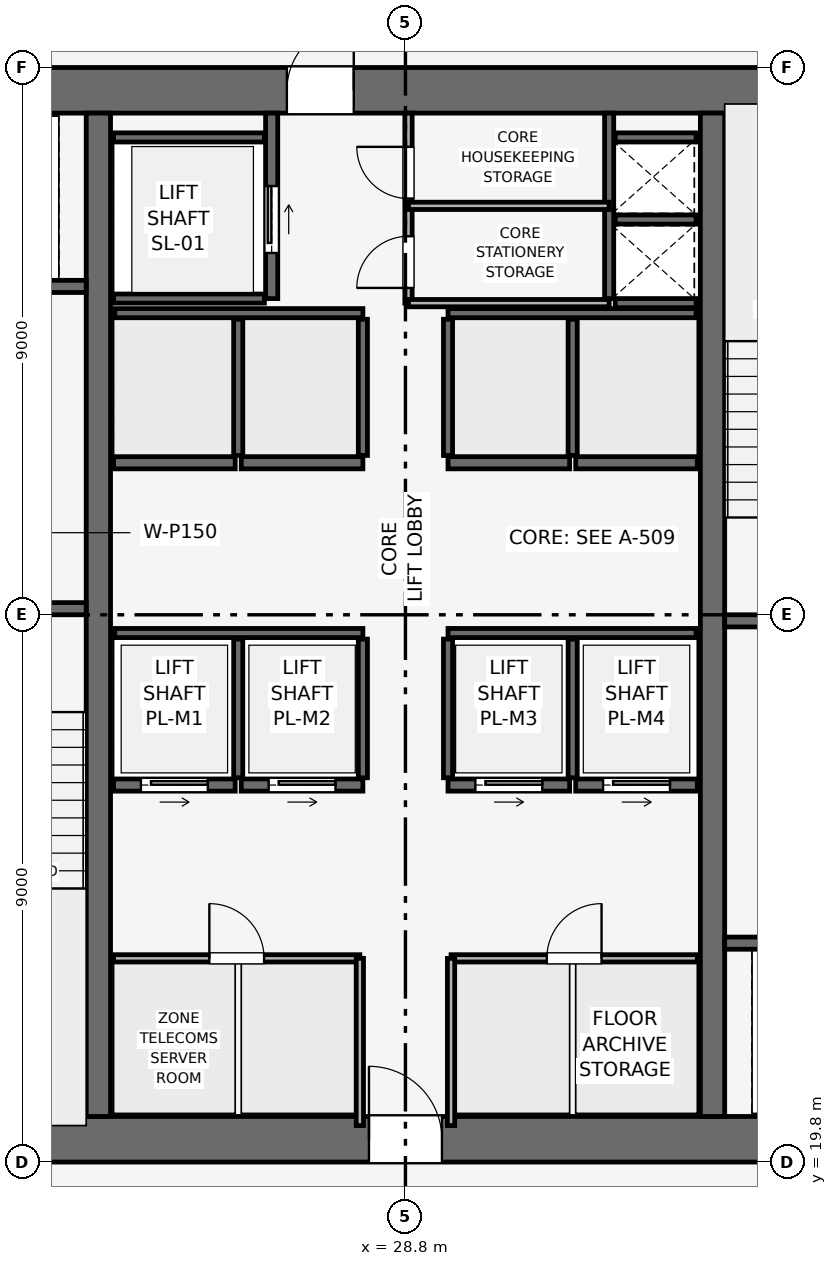
"""IFC4 building model, lengths in metres.
Left out: names, types, materials, properties, quantities, classifications, styles, units other than length and angle.
Written with IfcOpenShell. Run it as: python <this file> out.ifc"""

import sys

from ifc_helpers import new_model, si_unit, direction, frame, frame_2d, origin, place, context, subcontext, project, spatial, rectangle, extrude, element, fill, save


model = new_model("IFC4")
c1 = context("Model", 3, precision=1e-05, world=origin(), true_north=direction((0.0, 1.0)))
c2 = subcontext(c1, "Body", "Model", "MODEL_VIEW")
j1 = project(units=[si_unit("LENGTHUNIT", "METRE"), si_unit("PLANEANGLEUNIT", "RADIAN")], contexts=[c1])
p1 = place(None, origin())
s1 = spatial("IfcSite", under=j1, at=p1, CompositionType="ELEMENT")
p2 = place(p1, origin())
s2 = spatial("IfcBuilding", under=s1, at=p2, CompositionType="ELEMENT")
p3 = place(p2, frame((0.0, 0.0, 222.45)))
s3 = spatial("IfcBuildingStorey", under=s2, at=p3, CompositionType="ELEMENT", Elevation=222.45)
p4 = place(p3, frame((19.8, 20.175, 0.0), z_axis=(0.0, 0.0, 1.0), x_axis=(1.0, 0.0, 0.0)))
e1 = element("IfcWall", 1, at=p4, inside=s3, PredefinedType="SHEAR", context=c2, shape_type="SweptSolid", body=[
    extrude(rectangle(XDim=18.0, YDim=0.75, at=frame_2d((9.0, 0.0))), origin(), (0.0, 0.0, 1.0), 3.75),
])
p5 = place(p4, frame((8.4, 0.0, 0.0)))
e2 = element("IfcOpeningElement", 2, at=p5, cuts=e1, PredefinedType="OPENING", context=c2, shape_type="SweptSolid", body=[
    extrude(rectangle(XDim=1.2, YDim=2.2, at=frame_2d((0.6, 1.1))), frame((0.0, 0.385, 0.0), z_axis=(0.0, -1.0, 0.0), x_axis=(1.0, 0.0, 0.0)), (0.0, 0.0, 1.0), 0.77),
])
p6 = place(p3, frame((19.8, 37.425, 0.0), z_axis=(0.0, 0.0, 1.0), x_axis=(1.0, 0.0, 0.0)))
e3 = element("IfcWall", 3, at=p6, inside=s3, PredefinedType="SHEAR", context=c2, shape_type="SweptSolid", body=[
    extrude(rectangle(XDim=18.0, YDim=0.75, at=frame_2d((9.0, 0.0))), origin(), (0.0, 0.0, 1.0), 3.75),
])
p7 = place(p6, frame((7.05, 0.0, 0.0)))
e4 = element("IfcOpeningElement", 4, at=p7, cuts=e3, PredefinedType="OPENING", context=c2, shape_type="SweptSolid", body=[
    extrude(rectangle(XDim=1.1, YDim=2.15, at=frame_2d((0.55, 1.075))), frame((0.0, 0.385, 0.0), z_axis=(0.0, -1.0, 0.0), x_axis=(1.0, 0.0, 0.0)), (0.0, 0.0, 1.0), 0.77),
])
for number, where, z_axis, x_axis in (
    (5, (23.75, 20.55, 0.0), (0.0, 0.0, 1.0), (0.0, 1.0, 0.0)),
    (6, (33.85, 20.55, 0.0), (0.0, 0.0, 1.0), (0.0, 1.0, 0.0)),
):
    element("IfcWall", number, at=place(p3, frame(where, z_axis=z_axis, x_axis=x_axis)), inside=s3, PredefinedType="SHEAR", context=c2, shape_type="SweptSolid", body=[
        extrude(rectangle(XDim=16.5, YDim=0.4, at=frame_2d((8.25, 0.0))), origin(), (0.0, 0.0, 1.0), 3.75),
    ])
p8 = place(p3, frame((20.4, 28.9, 0.0), z_axis=(0.0, 0.0, 1.0), x_axis=(1.0, 0.0, 0.0)))
e7 = element("IfcWall", 7, at=p8, inside=s3, PredefinedType="SHEAR", context=c2, shape_type="SweptSolid", body=[
    extrude(rectangle(XDim=3.15, YDim=0.2, at=frame_2d((1.575, 0.0))), origin(), (0.0, 0.0, 1.0), 3.5),
])
p9 = place(p8, frame((0.8, 0.0, 0.0)))
e8 = element("IfcOpeningElement", 8, at=p9, cuts=e7, PredefinedType="OPENING", context=c2, shape_type="SweptSolid", body=[
    extrude(rectangle(XDim=1.0, YDim=2.1, at=frame_2d((0.5, 1.05))), frame((0.0, 0.11, 0.0), z_axis=(0.0, -1.0, 0.0), x_axis=(1.0, 0.0, 0.0)), (0.0, 0.0, 1.0), 0.22),
])
p10 = place(p3, frame((34.05, 28.7, 0.0), z_axis=(0.0, 0.0, 1.0), x_axis=(1.0, 0.0, 0.0)))
e9 = element("IfcWall", 9, at=p10, inside=s3, PredefinedType="SHEAR", context=c2, shape_type="SweptSolid", body=[
    extrude(rectangle(XDim=3.15, YDim=0.2, at=frame_2d((1.575, 0.0))), origin(), (0.0, 0.0, 1.0), 3.5),
])
p11 = place(p10, frame((0.8, 0.0, 0.0)))
e10 = element("IfcOpeningElement", 10, at=p11, cuts=e9, PredefinedType="OPENING", context=c2, shape_type="SweptSolid", body=[
    extrude(rectangle(XDim=1.0, YDim=2.1, at=frame_2d((0.5, 1.05))), frame((0.0, 0.11, 0.0), z_axis=(0.0, -1.0, 0.0), x_axis=(1.0, 0.0, 0.0)), (0.0, 0.0, 1.0), 0.22),
])
p12 = place(p3, frame((32.15, 34.0, 0.0), z_axis=(0.0, 0.0, 1.0), x_axis=(0.0, 1.0, 0.0)))
e11 = element("IfcWall", 11, at=p12, inside=s3, PredefinedType="SHEAR", context=c2, shape_type="SweptSolid", body=[
    extrude(rectangle(XDim=3.05, YDim=0.15, at=frame_2d((1.525, 0.0))), origin(), (0.0, 0.0, 1.0), 3.5),
])
for number, where, z_axis, x_axis in (
    (12, (32.25, 33.925, 0.0), (0.0, 0.0, 1.0), (1.0, 0.0, 0.0)),
    (13, (32.25, 35.3, 0.0), (0.0, 0.0, 1.0), (1.0, 0.0, 0.0)),
):
    element("IfcWall", number, at=place(p3, frame(where, z_axis=z_axis, x_axis=x_axis)), inside=s3, PredefinedType="SHEAR", context=c2, shape_type="SweptSolid", body=[
        extrude(rectangle(XDim=1.33, YDim=0.15, at=frame_2d((0.665, 0.0))), origin(), (0.0, 0.0, 1.0), 3.5),
    ])
p13 = place(p3, frame((20.5, 34.2, 0.0), z_axis=(0.0, 0.0, 1.0), x_axis=(1.0, 0.0, 0.0)))
e14 = element("IfcWall", 14, at=p13, inside=s3, PredefinedType="SHEAR", context=c2, shape_type="SweptSolid", body=[
    extrude(rectangle(XDim=3.05, YDim=0.2, at=frame_2d((1.525, 0.0))), origin(), (0.0, 0.0, 1.0), 3.5),
])
p14 = place(p13, frame((0.75, 0.0, 0.0)))
e15 = element("IfcOpeningElement", 15, at=p14, cuts=e14, PredefinedType="OPENING", context=c2, shape_type="SweptSolid", body=[
    extrude(rectangle(XDim=1.1, YDim=2.15, at=frame_2d((0.55, 1.075))), frame((0.0, 0.11, 0.0), z_axis=(0.0, -1.0, 0.0), x_axis=(1.0, 0.0, 0.0)), (0.0, 0.0, 1.0), 0.22),
])
p15 = place(p3, frame((34.05, 23.4, 0.0), z_axis=(0.0, 0.0, 1.0), x_axis=(1.0, 0.0, 0.0)))
e16 = element("IfcWall", 16, at=p15, inside=s3, PredefinedType="SHEAR", context=c2, shape_type="SweptSolid", body=[
    extrude(rectangle(XDim=3.05, YDim=0.2, at=frame_2d((1.525, 0.0))), origin(), (0.0, 0.0, 1.0), 3.5),
])
p16 = place(p15, frame((1.2, 0.0, 0.0)))
e17 = element("IfcOpeningElement", 17, at=p16, cuts=e16, PredefinedType="OPENING", context=c2, shape_type="SweptSolid", body=[
    extrude(rectangle(XDim=1.1, YDim=2.15, at=frame_2d((0.55, 1.075))), frame((0.0, 0.11, 0.0), z_axis=(0.0, -1.0, 0.0), x_axis=(1.0, 0.0, 0.0)), (0.0, 0.0, 1.0), 0.22),
])
p17 = place(p3, frame((26.6, 34.0, 0.0), z_axis=(0.0, 0.0, 1.0), x_axis=(0.0, 1.0, 0.0)))
e18 = element("IfcWall", 18, at=p17, inside=s3, PredefinedType="SHEAR", context=c2, shape_type="SweptSolid", body=[
    extrude(rectangle(XDim=3.05, YDim=0.2, at=frame_2d((1.525, 0.0))), origin(), (0.0, 0.0, 1.0), 3.5),
])
p18 = place(p17, frame((0.75, 0.0, 0.0)))
e19 = element("IfcOpeningElement", 19, at=p18, cuts=e18, PredefinedType="OPENING", context=c2, shape_type="SweptSolid", body=[
    extrude(rectangle(XDim=1.1, YDim=2.15, at=frame_2d((0.55, 1.075))), frame((0.0, 0.11, 0.0), z_axis=(0.0, -1.0, 0.0), x_axis=(1.0, 0.0, 0.0)), (0.0, 0.0, 1.0), 0.22),
])
for number, where, z_axis, x_axis in (
    (20, (24.0, 34.0, 0.0), (0.0, 0.0, 1.0), (1.0, 0.0, 0.0)),
    (21, (24.0, 36.65, 0.0), (0.0, 0.0, 1.0), (1.0, 0.0, 0.0)),
):
    element("IfcWall", number, at=place(p3, frame(where, z_axis=z_axis, x_axis=x_axis)), inside=s3, PredefinedType="SHEAR", context=c2, shape_type="SweptSolid", body=[
        extrude(rectangle(XDim=2.48, YDim=0.15, at=frame_2d((1.24, 0.0))), origin(), (0.0, 0.0, 1.0), 3.5),
    ])
p19 = place(p3, frame((24.0, 26.0, 0.0), z_axis=(0.0, 0.0, 1.0), x_axis=(1.0, 0.0, 0.0)))
e22 = element("IfcWall", 22, at=p19, inside=s3, PredefinedType="SHEAR", context=c2, shape_type="SweptSolid", body=[
    extrude(rectangle(XDim=2.0, YDim=0.2, at=frame_2d((1.0, 0.0))), origin(), (0.0, 0.0, 1.0), 3.5),
])
p20 = place(p19, frame((0.45, 0.0, 0.0)))
e23 = element("IfcOpeningElement", 23, at=p20, cuts=e22, PredefinedType="OPENING", context=c2, shape_type="SweptSolid", body=[
    extrude(rectangle(XDim=1.1, YDim=2.15, at=frame_2d((0.55, 1.075))), frame((0.0, 0.11, 0.0), z_axis=(0.0, -1.0, 0.0), x_axis=(1.0, 0.0, 0.0)), (0.0, 0.0, 1.0), 0.22),
])
p21 = place(p3, frame((26.1, 26.0, 0.0), z_axis=(0.0, 0.0, 1.0), x_axis=(1.0, 0.0, 0.0)))
e24 = element("IfcWall", 24, at=p21, inside=s3, PredefinedType="SHEAR", context=c2, shape_type="SweptSolid", body=[
    extrude(rectangle(XDim=2.0, YDim=0.2, at=frame_2d((1.0, 0.0))), origin(), (0.0, 0.0, 1.0), 3.5),
])
p22 = place(p21, frame((0.45, 0.0, 0.0)))
e25 = element("IfcOpeningElement", 25, at=p22, cuts=e24, PredefinedType="OPENING", context=c2, shape_type="SweptSolid", body=[
    extrude(rectangle(XDim=1.1, YDim=2.15, at=frame_2d((0.55, 1.075))), frame((0.0, 0.11, 0.0), z_axis=(0.0, -1.0, 0.0), x_axis=(1.0, 0.0, 0.0)), (0.0, 0.0, 1.0), 0.22),
])
p23 = place(p3, frame((29.5, 26.0, 0.0), z_axis=(0.0, 0.0, 1.0), x_axis=(1.0, 0.0, 0.0)))
e26 = element("IfcWall", 26, at=p23, inside=s3, PredefinedType="SHEAR", context=c2, shape_type="SweptSolid", body=[
    extrude(rectangle(XDim=2.0, YDim=0.2, at=frame_2d((1.0, 0.0))), origin(), (0.0, 0.0, 1.0), 3.5),
])
p24 = place(p23, frame((0.45, 0.0, 0.0)))
e27 = element("IfcOpeningElement", 27, at=p24, cuts=e26, PredefinedType="OPENING", context=c2, shape_type="SweptSolid", body=[
    extrude(rectangle(XDim=1.1, YDim=2.15, at=frame_2d((0.55, 1.075))), frame((0.0, 0.11, 0.0), z_axis=(0.0, -1.0, 0.0), x_axis=(1.0, 0.0, 0.0)), (0.0, 0.0, 1.0), 0.22),
])
p25 = place(p3, frame((31.6, 26.0, 0.0), z_axis=(0.0, 0.0, 1.0), x_axis=(1.0, 0.0, 0.0)))
e28 = element("IfcWall", 28, at=p25, inside=s3, PredefinedType="SHEAR", context=c2, shape_type="SweptSolid", body=[
    extrude(rectangle(XDim=2.0, YDim=0.2, at=frame_2d((1.0, 0.0))), origin(), (0.0, 0.0, 1.0), 3.5),
])
p26 = place(p25, frame((0.45, 0.0, 0.0)))
e29 = element("IfcOpeningElement", 29, at=p26, cuts=e28, PredefinedType="OPENING", context=c2, shape_type="SweptSolid", body=[
    extrude(rectangle(XDim=1.1, YDim=2.15, at=frame_2d((0.55, 1.075))), frame((0.0, 0.11, 0.0), z_axis=(0.0, -1.0, 0.0), x_axis=(1.0, 0.0, 0.0)), (0.0, 0.0, 1.0), 0.22),
])
for number, where, z_axis, x_axis in (
    (30, (24.0, 31.3, 0.0), (0.0, 0.0, 1.0), (1.0, 0.0, 0.0)),
    (31, (26.1, 31.3, 0.0), (0.0, 0.0, 1.0), (1.0, 0.0, 0.0)),
    (32, (29.5, 31.3, 0.0), (0.0, 0.0, 1.0), (1.0, 0.0, 0.0)),
    (33, (31.6, 31.3, 0.0), (0.0, 0.0, 1.0), (1.0, 0.0, 0.0)),
):
    element("IfcWall", number, at=place(p3, frame(where, z_axis=z_axis, x_axis=x_axis)), inside=s3, PredefinedType="SHEAR", context=c2, shape_type="SweptSolid", body=[
        extrude(rectangle(XDim=2.0, YDim=0.2, at=frame_2d((1.0, 0.0))), origin(), (0.0, 0.0, 1.0), 3.5),
    ])
p27 = place(p3, frame((32.25, 36.65, 0.0), z_axis=(0.0, 0.0, 1.0), x_axis=(1.0, 0.0, 0.0)))
e34 = element("IfcWall", 34, at=p27, inside=s3, PredefinedType="SHEAR", context=c2, shape_type="SweptSolid", body=[
    extrude(rectangle(XDim=1.33, YDim=0.15, at=frame_2d((0.665, 0.0))), origin(), (0.0, 0.0, 1.0), 3.5),
])
for number, where, z_axis, x_axis in (
    (35, (24.02, 28.5, 0.0), (0.0, 0.0, 1.0), (1.0, 0.0, 0.0)),
    (36, (29.5, 28.5, 0.0), (0.0, 0.0, 1.0), (1.0, 0.0, 0.0)),
):
    element("IfcWall", number, at=place(p3, frame(where, z_axis=z_axis, x_axis=x_axis)), inside=s3, PredefinedType="SHEAR", context=c2, shape_type="SweptSolid", body=[
        extrude(rectangle(XDim=4.08, YDim=0.15, at=frame_2d((2.04, 0.0))), origin(), (0.0, 0.0, 1.0), 3.5),
    ])
for number, where, z_axis, x_axis in (
    (37, (26.05, 26.12, 0.0), (0.0, 0.0, 1.0), (0.0, 1.0, 0.0)),
    (38, (28.1, 26.12, 0.0), (0.0, 0.0, 1.0), (0.0, 1.0, 0.0)),
    (39, (29.5, 26.12, 0.0), (0.0, 0.0, 1.0), (0.0, 1.0, 0.0)),
    (40, (31.55, 26.12, 0.0), (0.0, 0.0, 1.0), (0.0, 1.0, 0.0)),
):
    element("IfcWall", number, at=place(p3, frame(where, z_axis=z_axis, x_axis=x_axis)), inside=s3, PredefinedType="SHEAR", context=c2, shape_type="SweptSolid", body=[
        extrude(rectangle(XDim=2.28, YDim=0.15, at=frame_2d((1.14, 0.0))), origin(), (0.0, 0.0, 1.0), 3.5),
    ])
for number, where, z_axis, x_axis in (
    (41, (24.02, 33.76, 0.0), (0.0, 0.0, 1.0), (1.0, 0.0, 0.0)),
    (42, (29.5, 33.76, 0.0), (0.0, 0.0, 1.0), (1.0, 0.0, 0.0)),
):
    element("IfcWall", number, at=place(p3, frame(where, z_axis=z_axis, x_axis=x_axis)), inside=s3, PredefinedType="SHEAR", context=c2, shape_type="SweptSolid", body=[
        extrude(rectangle(XDim=4.08, YDim=0.15, at=frame_2d((2.04, 0.0))), origin(), (0.0, 0.0, 1.0), 3.5),
    ])
for number, where, z_axis, x_axis in (
    (43, (26.05, 31.42, 0.0), (0.0, 0.0, 1.0), (0.0, 1.0, 0.0)),
    (44, (28.1, 31.42, 0.0), (0.0, 0.0, 1.0), (0.0, 1.0, 0.0)),
    (45, (29.5, 31.42, 0.0), (0.0, 0.0, 1.0), (0.0, 1.0, 0.0)),
    (46, (31.55, 31.42, 0.0), (0.0, 0.0, 1.0), (0.0, 1.0, 0.0)),
):
    element("IfcWall", number, at=place(p3, frame(where, z_axis=z_axis, x_axis=x_axis)), inside=s3, PredefinedType="SHEAR", context=c2, shape_type="SweptSolid", body=[
        extrude(rectangle(XDim=2.24, YDim=0.15, at=frame_2d((1.12, 0.0))), origin(), (0.0, 0.0, 1.0), 3.5),
    ])
p28 = place(p3, frame((28.85, 33.925, 0.0), z_axis=(0.0, 0.0, 1.0), x_axis=(0.0, 1.0, 0.0)))
e47 = element("IfcWall", 47, at=p28, inside=s3, PredefinedType="PARTITIONING", context=c2, shape_type="SweptSolid", body=[
    extrude(rectangle(XDim=3.125, YDim=0.12, at=frame_2d((1.562, 0.0))), origin(), (0.0, 0.0, 1.0), 3.5),
])
p29 = place(p28, frame((0.25, 0.0, 0.0)))
e48 = element("IfcOpeningElement", 48, at=p29, cuts=e47, PredefinedType="OPENING", context=c2, shape_type="SweptSolid", body=[
    extrude(rectangle(XDim=0.85, YDim=2.1, at=frame_2d((0.425, 1.05))), frame((0.0, 0.07, 0.0), z_axis=(0.0, -1.0, 0.0), x_axis=(1.0, 0.0, 0.0)), (0.0, 0.0, 1.0), 0.14),
])
p30 = place(p28, frame((1.72, 0.0, 0.0)))
e49 = element("IfcOpeningElement", 49, at=p30, cuts=e47, PredefinedType="OPENING", context=c2, shape_type="SweptSolid", body=[
    extrude(rectangle(XDim=0.85, YDim=2.1, at=frame_2d((0.425, 1.05))), frame((0.0, 0.07, 0.0), z_axis=(0.0, -1.0, 0.0), x_axis=(1.0, 0.0, 0.0)), (0.0, 0.0, 1.0), 0.14),
])
for number, where, z_axis, x_axis in (
    (50, (28.85, 35.525, 0.0), (0.0, 0.0, 1.0), (1.0, 0.0, 0.0)),
    (51, (28.85, 33.925, 0.0), (0.0, 0.0, 1.0), (1.0, 0.0, 0.0)),
):
    element("IfcWall", number, at=place(p3, frame(where, z_axis=z_axis, x_axis=x_axis)), inside=s3, PredefinedType="PARTITIONING", context=c2, shape_type="SweptSolid", body=[
        extrude(rectangle(XDim=3.3, YDim=0.12, at=frame_2d((1.65, 0.0))), origin(), (0.0, 0.0, 1.0), 3.5),
    ])
p31 = place(p3, frame((24.0, 23.15, 0.0), z_axis=(0.0, 0.0, 1.0), x_axis=(1.0, 0.0, 0.0)))
e52 = element("IfcWall", 52, at=p31, inside=s3, PredefinedType="PARTITIONING", context=c2, shape_type="SweptSolid", body=[
    extrude(rectangle(XDim=4.05, YDim=0.12, at=frame_2d((2.025, 0.0))), origin(), (0.0, 0.0, 1.0), 3.5),
])
p32 = place(p31, frame((1.575, 0.0, 0.0)))
e53 = element("IfcOpeningElement", 53, at=p32, cuts=e52, PredefinedType="OPENING", context=c2, shape_type="SweptSolid", body=[
    extrude(rectangle(XDim=0.9, YDim=2.1, at=frame_2d((0.45, 1.05))), frame((0.0, 0.07, 0.0), z_axis=(0.0, -1.0, 0.0), x_axis=(1.0, 0.0, 0.0)), (0.0, 0.0, 1.0), 0.14),
])
p33 = place(p3, frame((28.05, 20.4, 0.0), z_axis=(0.0, 0.0, 1.0), x_axis=(0.0, 1.0, 0.0)))
e54 = element("IfcWall", 54, at=p33, inside=s3, PredefinedType="PARTITIONING", context=c2, shape_type="SweptSolid", body=[
    extrude(rectangle(XDim=2.75, YDim=0.12, at=frame_2d((1.375, 0.0))), origin(), (0.0, 0.0, 1.0), 3.5),
])
p34 = place(p3, frame((29.55, 23.15, 0.0), z_axis=(0.0, 0.0, 1.0), x_axis=(1.0, 0.0, 0.0)))
e55 = element("IfcWall", 55, at=p34, inside=s3, PredefinedType="PARTITIONING", context=c2, shape_type="SweptSolid", body=[
    extrude(rectangle(XDim=4.05, YDim=0.12, at=frame_2d((2.025, 0.0))), origin(), (0.0, 0.0, 1.0), 3.5),
])
p35 = place(p34, frame((1.575, 0.0, 0.0)))
e56 = element("IfcOpeningElement", 56, at=p35, cuts=e55, PredefinedType="OPENING", context=c2, shape_type="SweptSolid", body=[
    extrude(rectangle(XDim=0.9, YDim=2.1, at=frame_2d((0.45, 1.05))), frame((0.0, 0.07, 0.0), z_axis=(0.0, -1.0, 0.0), x_axis=(1.0, 0.0, 0.0)), (0.0, 0.0, 1.0), 0.14),
])
p36 = place(p3, frame((29.55, 20.4, 0.0), z_axis=(0.0, 0.0, 1.0), x_axis=(0.0, 1.0, 0.0)))
e57 = element("IfcWall", 57, at=p36, inside=s3, PredefinedType="PARTITIONING", context=c2, shape_type="SweptSolid", body=[
    extrude(rectangle(XDim=2.75, YDim=0.12, at=frame_2d((1.375, 0.0))), origin(), (0.0, 0.0, 1.0), 3.5),
])
p37 = place(p18, origin())
e58 = element("IfcDoor", 58, at=p37, inside=s3, OperationType="SLIDING_TO_RIGHT", PredefinedType="DOOR", context=c2, shape_type="SweptSolid", body=[
    extrude(rectangle(XDim=1.1, YDim=2.15, at=frame_2d((0.55, 1.075))), frame((0.0, 0.025, 0.0), z_axis=(0.0, -1.0, 0.0), x_axis=(1.0, 0.0, 0.0)), (0.0, 0.0, 1.0), 0.05),
])
fill(e19, e58)
p38 = place(p20, origin())
e59 = element("IfcDoor", 59, at=p38, inside=s3, OperationType="SLIDING_TO_RIGHT", PredefinedType="DOOR", context=c2, shape_type="SweptSolid", body=[
    extrude(rectangle(XDim=1.1, YDim=2.15, at=frame_2d((0.55, 1.075))), frame((0.0, 0.025, 0.0), z_axis=(0.0, -1.0, 0.0), x_axis=(1.0, 0.0, 0.0)), (0.0, 0.0, 1.0), 0.05),
])
fill(e23, e59)
p39 = place(p22, origin())
e60 = element("IfcDoor", 60, at=p39, inside=s3, OperationType="SLIDING_TO_RIGHT", PredefinedType="DOOR", context=c2, shape_type="SweptSolid", body=[
    extrude(rectangle(XDim=1.1, YDim=2.15, at=frame_2d((0.55, 1.075))), frame((0.0, 0.025, 0.0), z_axis=(0.0, -1.0, 0.0), x_axis=(1.0, 0.0, 0.0)), (0.0, 0.0, 1.0), 0.05),
])
fill(e25, e60)
p40 = place(p24, origin())
e61 = element("IfcDoor", 61, at=p40, inside=s3, OperationType="SLIDING_TO_RIGHT", PredefinedType="DOOR", context=c2, shape_type="SweptSolid", body=[
    extrude(rectangle(XDim=1.1, YDim=2.15, at=frame_2d((0.55, 1.075))), frame((0.0, 0.025, 0.0), z_axis=(0.0, -1.0, 0.0), x_axis=(1.0, 0.0, 0.0)), (0.0, 0.0, 1.0), 0.05),
])
fill(e27, e61)
p41 = place(p26, origin())
e62 = element("IfcDoor", 62, at=p41, inside=s3, OperationType="SLIDING_TO_RIGHT", PredefinedType="DOOR", context=c2, shape_type="SweptSolid", body=[
    extrude(rectangle(XDim=1.1, YDim=2.15, at=frame_2d((0.55, 1.075))), frame((0.0, 0.025, 0.0), z_axis=(0.0, -1.0, 0.0), x_axis=(1.0, 0.0, 0.0)), (0.0, 0.0, 1.0), 0.05),
])
fill(e29, e62)
p42 = place(p29, origin())
e63 = element("IfcDoor", 63, at=p42, inside=s3, OperationType="SINGLE_SWING_LEFT", PredefinedType="DOOR", context=c2, shape_type="SweptSolid", body=[
    extrude(rectangle(XDim=0.85, YDim=2.1, at=frame_2d((0.425, 1.05))), frame((0.0, 0.025, 0.0), z_axis=(0.0, -1.0, 0.0), x_axis=(1.0, 0.0, 0.0)), (0.0, 0.0, 1.0), 0.05),
])
fill(e48, e63)
p43 = place(p30, origin())
e64 = element("IfcDoor", 64, at=p43, inside=s3, OperationType="SINGLE_SWING_RIGHT", PredefinedType="DOOR", context=c2, shape_type="SweptSolid", body=[
    extrude(rectangle(XDim=0.85, YDim=2.1, at=frame_2d((0.425, 1.05))), frame((0.0, 0.025, 0.0), z_axis=(0.0, -1.0, 0.0), x_axis=(1.0, 0.0, 0.0)), (0.0, 0.0, 1.0), 0.05),
])
fill(e49, e64)
p44 = place(p32, origin())
e65 = element("IfcDoor", 65, at=p44, inside=s3, OperationType="SINGLE_SWING_LEFT", PredefinedType="DOOR", context=c2, shape_type="SweptSolid", body=[
    extrude(rectangle(XDim=0.9, YDim=2.1, at=frame_2d((0.45, 1.05))), frame((0.0, 0.025, 0.0), z_axis=(0.0, -1.0, 0.0), x_axis=(1.0, 0.0, 0.0)), (0.0, 0.0, 1.0), 0.05),
])
fill(e53, e65)
p45 = place(p35, origin())
e66 = element("IfcDoor", 66, at=p45, inside=s3, OperationType="SINGLE_SWING_RIGHT", PredefinedType="DOOR", context=c2, shape_type="SweptSolid", body=[
    extrude(rectangle(XDim=0.9, YDim=2.1, at=frame_2d((0.45, 1.05))), frame((0.0, 0.025, 0.0), z_axis=(0.0, -1.0, 0.0), x_axis=(1.0, 0.0, 0.0)), (0.0, 0.0, 1.0), 0.05),
])
fill(e56, e66)
p46 = place(p5, origin())
e67 = element("IfcDoor", 67, at=p46, inside=s3, OperationType="SINGLE_SWING_LEFT", PredefinedType="DOOR", context=c2, shape_type="SweptSolid", body=[
    extrude(rectangle(XDim=1.2, YDim=2.2, at=frame_2d((0.6, 1.1))), frame((0.0, 0.025, 0.0), z_axis=(0.0, -1.0, 0.0), x_axis=(1.0, 0.0, 0.0)), (0.0, 0.0, 1.0), 0.05),
])
fill(e2, e67)
p47 = place(p7, origin())
e68 = element("IfcDoor", 68, at=p47, inside=s3, OperationType="SINGLE_SWING_RIGHT", PredefinedType="DOOR", context=c2, shape_type="SweptSolid", body=[
    extrude(rectangle(XDim=1.1, YDim=2.15, at=frame_2d((0.55, 1.075))), frame((0.0, 0.025, 0.0), z_axis=(0.0, -1.0, 0.0), x_axis=(1.0, 0.0, 0.0)), (0.0, 0.0, 1.0), 0.05),
])
fill(e4, e68)
save(model, sys.argv[1])
